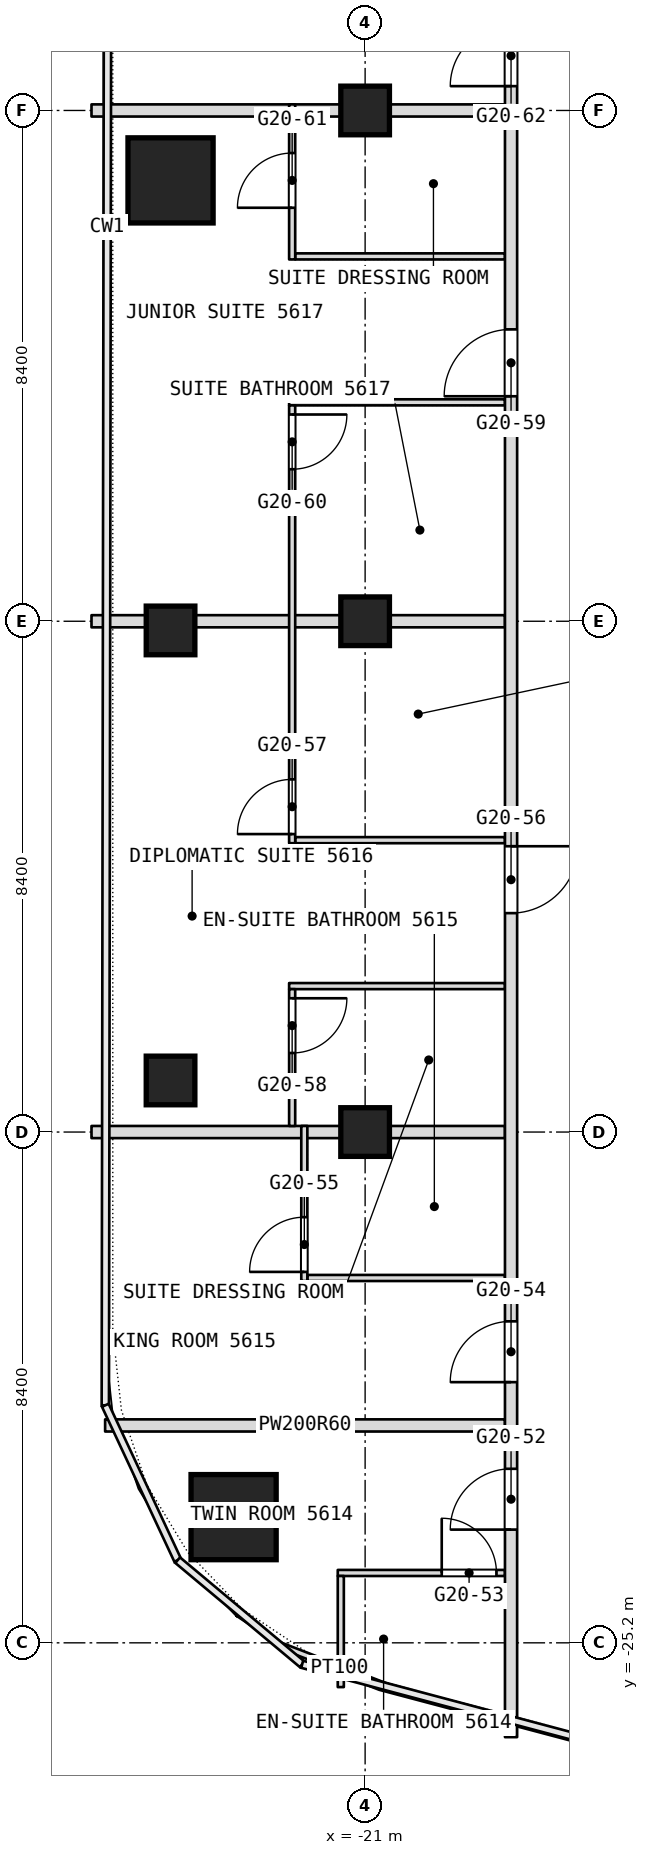
"""IFC4 building model, lengths in metres.
Left out: names, types, materials, properties, quantities, classifications, styles, units other than length and angle.
Written with IfcOpenShell. Run it as: python <this file> out.ifc"""

import sys

from ifc_helpers import new_model, si_unit, direction, frame, frame_2d, origin, origin_2d, place, context, subcontext, project, spatial, rectangle, extrude, element, fill, save


model = new_model("IFC4")
c1 = context("Model", 3, precision=1e-05, world=origin(), true_north=direction((0.0, 1.0)))
c2 = subcontext(c1, "Body", "Model", "MODEL_VIEW")
j1 = project(units=[si_unit("LENGTHUNIT", "METRE"), si_unit("PLANEANGLEUNIT", "RADIAN")], contexts=[c1])
p1 = place(None, origin())
s1 = spatial("IfcSite", under=j1, at=p1, CompositionType="ELEMENT")
p2 = place(p1, origin())
s2 = spatial("IfcBuilding", under=s1, at=p2, CompositionType="ELEMENT")
p3 = place(p2, frame((0.0, 0.0, 238.1)))
s3 = spatial("IfcBuildingStorey", under=s2, at=p3, CompositionType="ELEMENT", Elevation=238.1)
for number, where, z_axis, x_axis in (
    (1, (-23.163, -23.133, 0.0), (0.0, 0.0, 1.0), (1.0, 0.0, 0.0)),
    (2, (-24.2, -1.15, 0.0), (0.0, 0.0, 1.0), (1.0, 0.0, 0.0)),
):
    element("IfcColumn", number, at=place(p3, frame(where, z_axis=z_axis, x_axis=x_axis)), inside=s3, PredefinedType="COLUMN", context=c2, shape_type="SweptSolid", body=[
        extrude(rectangle(XDim=1.4, YDim=1.4, at=origin_2d()), origin(), (0.0, 0.0, 1.0), 3.6),
    ])
for number, where, z_axis, x_axis in (
    (3, (-21.0, -16.8, 0.0), (0.0, 0.0, 1.0), (1.0, 0.0, 0.0)),
    (4, (-21.0, -8.4, 0.0), (0.0, 0.0, 1.0), (1.0, 0.0, 0.0)),
    (5, (-21.0, 0.0, 0.0), (0.0, 0.0, 1.0), (1.0, 0.0, 0.0)),
    (6, (-24.2, -15.952, 0.0), (0.0, 0.0, 1.0), (1.0, 0.0, 0.0)),
    (7, (-24.2, -8.551, 0.0), (0.0, 0.0, 1.0), (1.0, 0.0, 0.0)),
):
    element("IfcColumn", number, at=place(p3, frame(where, z_axis=z_axis, x_axis=x_axis)), inside=s3, PredefinedType="COLUMN", context=c2, shape_type="SweptSolid", body=[
        extrude(rectangle(XDim=0.8, YDim=0.8, at=origin_2d()), origin(), (0.0, 0.0, 1.0), 3.6),
    ])
p4 = place(p3, frame((-22.386, -25.247, 0.0), z_axis=(0.0, 0.0, 1.0), x_axis=(0.932741240306, -0.360546499959, 0.0)))
e8 = element("IfcWall", 8, at=p4, inside=s3, PredefinedType="PARTITIONING", context=c2, shape_type="SweptSolid", body=[
    extrude(rectangle(XDim=2.066, YDim=0.1, at=frame_2d((1.033, 0.0))), origin(), (0.0, 0.0, 1.0), 3.34),
])
p5 = place(p3, frame((-21.45, -24.051, 0.0), z_axis=(0.0, 0.0, 1.0), x_axis=(1.0, 0.0, 0.0)))
e9 = element("IfcWall", 9, at=p5, inside=s3, PredefinedType="PARTITIONING", context=c2, shape_type="SweptSolid", body=[
    extrude(rectangle(XDim=2.75, YDim=0.1, at=frame_2d((1.375, 0.0))), origin(), (0.0, 0.0, 1.0), 3.34),
])
p6 = place(p5, frame((1.71, 0.0, 0.0)))
e10 = element("IfcOpeningElement", 10, at=p6, cuts=e9, PredefinedType="OPENING", context=c2, shape_type="SweptSolid", body=[
    extrude(rectangle(XDim=0.9, YDim=2.1, at=frame_2d((0.45, 1.05))), frame((0.0, 0.05, 0.0), z_axis=(0.0, -1.0, 0.0), x_axis=(1.0, 0.0, 0.0)), (0.0, 0.0, 1.0), 0.1),
])
p7 = place(p3, frame((-25.276, -21.625, 0.0), z_axis=(0.0, 0.0, 1.0), x_axis=(1.0, 0.0, 0.0)))
e11 = element("IfcWall", 11, at=p7, inside=s3, PredefinedType="PARTITIONING", context=c2, shape_type="SweptSolid", body=[
    extrude(rectangle(XDim=6.576, YDim=0.2, at=frame_2d((3.288, 0.0))), origin(), (0.0, 0.0, 1.0), 3.34),
])
p8 = place(p3, frame((-21.95, -19.2, 0.0), z_axis=(0.0, 0.0, 1.0), x_axis=(1.0, 0.0, 0.0)))
e12 = element("IfcWall", 12, at=p8, inside=s3, PredefinedType="PARTITIONING", context=c2, shape_type="SweptSolid", body=[
    extrude(rectangle(XDim=3.25, YDim=0.1, at=frame_2d((1.625, 0.0))), origin(), (0.0, 0.0, 1.0), 3.34),
])
p9 = place(p3, frame((-25.5, -16.8, 0.0), z_axis=(0.0, 0.0, 1.0), x_axis=(1.0, 0.0, 0.0)))
e13 = element("IfcWall", 13, at=p9, inside=s3, PredefinedType="PARTITIONING", context=c2, shape_type="SweptSolid", body=[
    extrude(rectangle(XDim=6.8, YDim=0.2, at=frame_2d((3.4, 0.0))), origin(), (0.0, 0.0, 1.0), 2.94),
])
p10 = place(p3, frame((-22.25, -14.4, 0.0), z_axis=(0.0, 0.0, 1.0), x_axis=(1.0, 0.0, 0.0)))
e14 = element("IfcWall", 14, at=p10, inside=s3, PredefinedType="PARTITIONING", context=c2, shape_type="SweptSolid", body=[
    extrude(rectangle(XDim=3.55, YDim=0.1, at=frame_2d((1.775, 0.0))), origin(), (0.0, 0.0, 1.0), 3.34),
])
p11 = place(p3, frame((-22.15, -12.0, 0.0), z_axis=(0.0, 0.0, 1.0), x_axis=(1.0, 0.0, 0.0)))
e15 = element("IfcWall", 15, at=p11, inside=s3, PredefinedType="PARTITIONING", context=c2, shape_type="SweptSolid", body=[
    extrude(rectangle(XDim=3.45, YDim=0.1, at=frame_2d((1.725, 0.0))), origin(), (0.0, 0.0, 1.0), 3.34),
])
p12 = place(p3, frame((-25.5, -8.4, 0.0), z_axis=(0.0, 0.0, 1.0), x_axis=(1.0, 0.0, 0.0)))
e16 = element("IfcWall", 16, at=p12, inside=s3, PredefinedType="PARTITIONING", context=c2, shape_type="SweptSolid", body=[
    extrude(rectangle(XDim=6.8, YDim=0.2, at=frame_2d((3.4, 0.0))), origin(), (0.0, 0.0, 1.0), 2.94),
])
p13 = place(p3, frame((-22.25, -4.8, 0.0), z_axis=(0.0, 0.0, 1.0), x_axis=(1.0, 0.0, 0.0)))
e17 = element("IfcWall", 17, at=p13, inside=s3, PredefinedType="PARTITIONING", context=c2, shape_type="SweptSolid", body=[
    extrude(rectangle(XDim=3.55, YDim=0.1, at=frame_2d((1.775, 0.0))), origin(), (0.0, 0.0, 1.0), 3.34),
])
p14 = place(p3, frame((-22.15, -2.4, 0.0), z_axis=(0.0, 0.0, 1.0), x_axis=(1.0, 0.0, 0.0)))
e18 = element("IfcWall", 18, at=p14, inside=s3, PredefinedType="PARTITIONING", context=c2, shape_type="SweptSolid", body=[
    extrude(rectangle(XDim=3.45, YDim=0.1, at=frame_2d((1.725, 0.0))), origin(), (0.0, 0.0, 1.0), 3.34),
])
p15 = place(p3, frame((-25.5, 0.0, 0.0), z_axis=(0.0, 0.0, 1.0), x_axis=(1.0, 0.0, 0.0)))
e19 = element("IfcWall", 19, at=p15, inside=s3, PredefinedType="PARTITIONING", context=c2, shape_type="SweptSolid", body=[
    extrude(rectangle(XDim=6.8, YDim=0.2, at=frame_2d((3.4, 0.0))), origin(), (0.0, 0.0, 1.0), 2.94),
])
p16 = place(p3, frame((-18.6, -26.751, 0.0), z_axis=(0.0, 0.0, 1.0), x_axis=(0.0, 1.0, 0.0)))
e20 = element("IfcWall", 20, at=p16, inside=s3, PredefinedType="PARTITIONING", context=c2, shape_type="SweptSolid", body=[
    extrude(rectangle(XDim=49.091, YDim=0.2, at=frame_2d((24.545, 0.0))), origin(), (0.0, 0.0, 1.0), 3.34),
])
p17 = place(p16, frame((3.413, 0.0, 0.0)))
e21 = element("IfcOpeningElement", 21, at=p17, cuts=e20, PredefinedType="OPENING", context=c2, shape_type="SweptSolid", body=[
    extrude(rectangle(XDim=1.0, YDim=2.1, at=frame_2d((0.5, 1.05))), frame((0.0, 0.1, 0.0), z_axis=(0.0, -1.0, 0.0), x_axis=(1.0, 0.0, 0.0)), (0.0, 0.0, 1.0), 0.2),
])
p18 = place(p16, frame((5.838, 0.0, 0.0)))
e22 = element("IfcOpeningElement", 22, at=p18, cuts=e20, PredefinedType="OPENING", context=c2, shape_type="SweptSolid", body=[
    extrude(rectangle(XDim=1.0, YDim=2.1, at=frame_2d((0.5, 1.05))), frame((0.0, 0.1, 0.0), z_axis=(0.0, -1.0, 0.0), x_axis=(1.0, 0.0, 0.0)), (0.0, 0.0, 1.0), 0.2),
])
p19 = place(p16, frame((13.551, 0.0, 0.0)))
e23 = element("IfcOpeningElement", 23, at=p19, cuts=e20, PredefinedType="OPENING", context=c2, shape_type="SweptSolid", body=[
    extrude(rectangle(XDim=1.1, YDim=2.1, at=frame_2d((0.55, 1.05))), frame((0.0, 0.1, 0.0), z_axis=(0.0, -1.0, 0.0), x_axis=(1.0, 0.0, 0.0)), (0.0, 0.0, 1.0), 0.2),
])
p20 = place(p16, frame((22.051, 0.0, 0.0)))
e24 = element("IfcOpeningElement", 24, at=p20, cuts=e20, PredefinedType="OPENING", context=c2, shape_type="SweptSolid", body=[
    extrude(rectangle(XDim=1.1, YDim=2.1, at=frame_2d((0.55, 1.05))), frame((0.0, 0.1, 0.0), z_axis=(0.0, -1.0, 0.0), x_axis=(1.0, 0.0, 0.0)), (0.0, 0.0, 1.0), 0.2),
])
p21 = place(p16, frame((27.151, 0.0, 0.0)))
e25 = element("IfcOpeningElement", 25, at=p21, cuts=e20, PredefinedType="OPENING", context=c2, shape_type="SweptSolid", body=[
    extrude(rectangle(XDim=1.0, YDim=2.1, at=frame_2d((0.5, 1.05))), frame((0.0, 0.1, 0.0), z_axis=(0.0, -1.0, 0.0), x_axis=(1.0, 0.0, 0.0)), (0.0, 0.0, 1.0), 0.2),
])
p22 = place(p16, frame((33.751, 0.0, 0.0)))
e26 = element("IfcOpeningElement", 26, at=p22, cuts=e20, PredefinedType="OPENING", context=c2, shape_type="SweptSolid", body=[
    extrude(rectangle(XDim=1.0, YDim=2.1, at=frame_2d((0.5, 1.05))), frame((0.0, 0.1, 0.0), z_axis=(0.0, -1.0, 0.0), x_axis=(1.0, 0.0, 0.0)), (0.0, 0.0, 1.0), 0.2),
])
p23 = place(p16, frame((37.951, 0.0, 0.0)))
e27 = element("IfcOpeningElement", 27, at=p23, cuts=e20, PredefinedType="OPENING", context=c2, shape_type="SweptSolid", body=[
    extrude(rectangle(XDim=1.0, YDim=2.1, at=frame_2d((0.5, 1.05))), frame((0.0, 0.1, 0.0), z_axis=(0.0, -1.0, 0.0), x_axis=(1.0, 0.0, 0.0)), (0.0, 0.0, 1.0), 0.2),
])
p24 = place(p16, frame((39.751, 0.0, 0.0)))
e28 = element("IfcOpeningElement", 28, at=p24, cuts=e20, PredefinedType="OPENING", context=c2, shape_type="SweptSolid", body=[
    extrude(rectangle(XDim=1.0, YDim=2.1, at=frame_2d((0.5, 1.05))), frame((0.0, 0.1, 0.0), z_axis=(0.0, -1.0, 0.0), x_axis=(1.0, 0.0, 0.0)), (0.0, 0.0, 1.0), 0.2),
])
p25 = place(p16, frame((44.051, 0.0, 0.0)))
e29 = element("IfcOpeningElement", 29, at=p25, cuts=e20, PredefinedType="OPENING", context=c2, shape_type="SweptSolid", body=[
    extrude(rectangle(XDim=1.0, YDim=2.1, at=frame_2d((0.5, 1.05))), frame((0.0, 0.1, 0.0), z_axis=(0.0, -1.0, 0.0), x_axis=(1.0, 0.0, 0.0)), (0.0, 0.0, 1.0), 0.2),
])
p26 = place(p3, frame((-21.4, -25.928, 0.0), z_axis=(0.0, 0.0, 1.0), x_axis=(0.0, 1.0, 0.0)))
e30 = element("IfcWall", 30, at=p26, inside=s3, PredefinedType="PARTITIONING", context=c2, shape_type="SweptSolid", body=[
    extrude(rectangle(XDim=1.827, YDim=0.1, at=frame_2d((0.914, 0.0))), origin(), (0.0, 0.0, 1.0), 3.34),
])
p27 = place(p3, frame((-22.0, -19.25, 0.0), z_axis=(0.0, 0.0, 1.0), x_axis=(0.0, 1.0, 0.0)))
e31 = element("IfcWall", 31, at=p27, inside=s3, PredefinedType="PARTITIONING", context=c2, shape_type="SweptSolid", body=[
    extrude(rectangle(XDim=2.55, YDim=0.1, at=frame_2d((1.275, 0.0))), origin(), (0.0, 0.0, 1.0), 3.34),
])
p28 = place(p27, frame((0.15, 0.0, 0.0)))
e32 = element("IfcOpeningElement", 32, at=p28, cuts=e31, PredefinedType="OPENING", context=c2, shape_type="SweptSolid", body=[
    extrude(rectangle(XDim=0.9, YDim=2.1, at=frame_2d((0.45, 1.05))), frame((0.0, 0.05, 0.0), z_axis=(0.0, -1.0, 0.0), x_axis=(1.0, 0.0, 0.0)), (0.0, 0.0, 1.0), 0.1),
])
p29 = place(p3, frame((-22.2, -16.7, 0.0), z_axis=(0.0, 0.0, 1.0), x_axis=(0.0, 1.0, 0.0)))
e33 = element("IfcWall", 33, at=p29, inside=s3, PredefinedType="PARTITIONING", context=c2, shape_type="SweptSolid", body=[
    extrude(rectangle(XDim=2.25, YDim=0.1, at=frame_2d((1.125, 0.0))), origin(), (0.0, 0.0, 1.0), 3.34),
])
p30 = place(p29, frame((1.2, 0.0, 0.0)))
e34 = element("IfcOpeningElement", 34, at=p30, cuts=e33, PredefinedType="OPENING", context=c2, shape_type="SweptSolid", body=[
    extrude(rectangle(XDim=0.9, YDim=2.1, at=frame_2d((0.45, 1.05))), frame((0.0, 0.05, 0.0), z_axis=(0.0, -1.0, 0.0), x_axis=(1.0, 0.0, 0.0)), (0.0, 0.0, 1.0), 0.1),
])
p31 = place(p3, frame((-22.2, -12.05, 0.0), z_axis=(0.0, 0.0, 1.0), x_axis=(0.0, 1.0, 0.0)))
e35 = element("IfcWall", 35, at=p31, inside=s3, PredefinedType="PARTITIONING", context=c2, shape_type="SweptSolid", body=[
    extrude(rectangle(XDim=7.2, YDim=0.1, at=frame_2d((3.6, 0.0))), origin(), (0.0, 0.0, 1.0), 3.34),
])
p32 = place(p31, frame((0.15, 0.0, 0.0)))
e36 = element("IfcOpeningElement", 36, at=p32, cuts=e35, PredefinedType="OPENING", context=c2, shape_type="SweptSolid", body=[
    extrude(rectangle(XDim=0.9, YDim=2.1, at=frame_2d((0.45, 1.05))), frame((0.0, 0.05, 0.0), z_axis=(0.0, -1.0, 0.0), x_axis=(1.0, 0.0, 0.0)), (0.0, 0.0, 1.0), 0.1),
])
p33 = place(p31, frame((6.15, 0.0, 0.0)))
e37 = element("IfcOpeningElement", 37, at=p33, cuts=e35, PredefinedType="OPENING", context=c2, shape_type="SweptSolid", body=[
    extrude(rectangle(XDim=0.9, YDim=2.1, at=frame_2d((0.45, 1.05))), frame((0.0, 0.05, 0.0), z_axis=(0.0, -1.0, 0.0), x_axis=(1.0, 0.0, 0.0)), (0.0, 0.0, 1.0), 0.1),
])
p34 = place(p3, frame((-22.2, -2.45, 0.0), z_axis=(0.0, 0.0, 1.0), x_axis=(0.0, 1.0, 0.0)))
e38 = element("IfcWall", 38, at=p34, inside=s3, PredefinedType="PARTITIONING", context=c2, shape_type="SweptSolid", body=[
    extrude(rectangle(XDim=2.55, YDim=0.1, at=frame_2d((1.275, 0.0))), origin(), (0.0, 0.0, 1.0), 3.34),
])
p35 = place(p34, frame((0.85, 0.0, 0.0)))
e39 = element("IfcOpeningElement", 39, at=p35, cuts=e38, PredefinedType="OPENING", context=c2, shape_type="SweptSolid", body=[
    extrude(rectangle(XDim=0.9, YDim=2.1, at=frame_2d((0.45, 1.05))), frame((0.0, 0.05, 0.0), z_axis=(0.0, -1.0, 0.0), x_axis=(1.0, 0.0, 0.0)), (0.0, 0.0, 1.0), 0.1),
])
p36 = place(p6, origin())
e40 = element("IfcDoor", 40, at=p36, inside=s3, OperationType="SINGLE_SWING_LEFT", PredefinedType="DOOR", context=c2, shape_type="SweptSolid", body=[
    extrude(rectangle(XDim=0.9, YDim=2.1, at=frame_2d((0.45, 1.05))), frame((0.0, 0.025, 0.0), z_axis=(0.0, -1.0, 0.0), x_axis=(1.0, 0.0, 0.0)), (0.0, 0.0, 1.0), 0.05),
])
fill(e10, e40)
p37 = place(p17, origin())
e41 = element("IfcDoor", 41, at=p37, inside=s3, OperationType="SINGLE_SWING_LEFT", PredefinedType="DOOR", context=c2, shape_type="SweptSolid", body=[
    extrude(rectangle(XDim=1.0, YDim=2.1, at=frame_2d((0.5, 1.05))), frame((0.0, 0.025, 0.0), z_axis=(0.0, -1.0, 0.0), x_axis=(1.0, 0.0, 0.0)), (0.0, 0.0, 1.0), 0.05),
])
fill(e21, e41)
p38 = place(p18, origin())
e42 = element("IfcDoor", 42, at=p38, inside=s3, OperationType="SINGLE_SWING_LEFT", PredefinedType="DOOR", context=c2, shape_type="SweptSolid", body=[
    extrude(rectangle(XDim=1.0, YDim=2.1, at=frame_2d((0.5, 1.05))), frame((0.0, 0.025, 0.0), z_axis=(0.0, -1.0, 0.0), x_axis=(1.0, 0.0, 0.0)), (0.0, 0.0, 1.0), 0.05),
])
fill(e22, e42)
p39 = place(p19, origin())
e43 = element("IfcDoor", 43, at=p39, inside=s3, OperationType="SINGLE_SWING_RIGHT", PredefinedType="DOOR", context=c2, shape_type="SweptSolid", body=[
    extrude(rectangle(XDim=1.1, YDim=2.1, at=frame_2d((0.55, 1.05))), frame((0.0, 0.025, 0.0), z_axis=(0.0, -1.0, 0.0), x_axis=(1.0, 0.0, 0.0)), (0.0, 0.0, 1.0), 0.05),
])
fill(e23, e43)
p40 = place(p20, origin())
e44 = element("IfcDoor", 44, at=p40, inside=s3, OperationType="SINGLE_SWING_LEFT", PredefinedType="DOOR", context=c2, shape_type="SweptSolid", body=[
    extrude(rectangle(XDim=1.1, YDim=2.1, at=frame_2d((0.55, 1.05))), frame((0.0, 0.025, 0.0), z_axis=(0.0, -1.0, 0.0), x_axis=(1.0, 0.0, 0.0)), (0.0, 0.0, 1.0), 0.05),
])
fill(e24, e44)
p41 = place(p21, origin())
e45 = element("IfcDoor", 45, at=p41, inside=s3, OperationType="SINGLE_SWING_LEFT", PredefinedType="DOOR", context=c2, shape_type="SweptSolid", body=[
    extrude(rectangle(XDim=1.0, YDim=2.1, at=frame_2d((0.5, 1.05))), frame((0.0, 0.025, 0.0), z_axis=(0.0, -1.0, 0.0), x_axis=(1.0, 0.0, 0.0)), (0.0, 0.0, 1.0), 0.05),
])
fill(e25, e45)
p42 = place(p28, origin())
e46 = element("IfcDoor", 46, at=p42, inside=s3, OperationType="SINGLE_SWING_RIGHT", PredefinedType="DOOR", context=c2, shape_type="SweptSolid", body=[
    extrude(rectangle(XDim=0.9, YDim=2.1, at=frame_2d((0.45, 1.05))), frame((0.0, 0.025, 0.0), z_axis=(0.0, -1.0, 0.0), x_axis=(1.0, 0.0, 0.0)), (0.0, 0.0, 1.0), 0.05),
])
fill(e32, e46)
p43 = place(p30, origin())
e47 = element("IfcDoor", 47, at=p43, inside=s3, OperationType="SINGLE_SWING_LEFT", PredefinedType="DOOR", context=c2, shape_type="SweptSolid", body=[
    extrude(rectangle(XDim=0.9, YDim=2.1, at=frame_2d((0.45, 1.05))), frame((0.0, 0.025, 0.0), z_axis=(0.0, -1.0, 0.0), x_axis=(1.0, 0.0, 0.0)), (0.0, 0.0, 1.0), 0.05),
])
fill(e34, e47)
p44 = place(p32, origin())
e48 = element("IfcDoor", 48, at=p44, inside=s3, OperationType="SINGLE_SWING_RIGHT", PredefinedType="DOOR", context=c2, shape_type="SweptSolid", body=[
    extrude(rectangle(XDim=0.9, YDim=2.1, at=frame_2d((0.45, 1.05))), frame((0.0, 0.025, 0.0), z_axis=(0.0, -1.0, 0.0), x_axis=(1.0, 0.0, 0.0)), (0.0, 0.0, 1.0), 0.05),
])
fill(e36, e48)
p45 = place(p33, origin())
e49 = element("IfcDoor", 49, at=p45, inside=s3, OperationType="SINGLE_SWING_LEFT", PredefinedType="DOOR", context=c2, shape_type="SweptSolid", body=[
    extrude(rectangle(XDim=0.9, YDim=2.1, at=frame_2d((0.45, 1.05))), frame((0.0, 0.025, 0.0), z_axis=(0.0, -1.0, 0.0), x_axis=(1.0, 0.0, 0.0)), (0.0, 0.0, 1.0), 0.05),
])
fill(e37, e49)
p46 = place(p35, origin())
e50 = element("IfcDoor", 50, at=p46, inside=s3, OperationType="SINGLE_SWING_LEFT", PredefinedType="DOOR", context=c2, shape_type="SweptSolid", body=[
    extrude(rectangle(XDim=0.9, YDim=2.1, at=frame_2d((0.45, 1.05))), frame((0.0, 0.025, 0.0), z_axis=(0.0, -1.0, 0.0), x_axis=(1.0, 0.0, 0.0)), (0.0, 0.0, 1.0), 0.05),
])
fill(e39, e50)
save(model, sys.argv[1])
